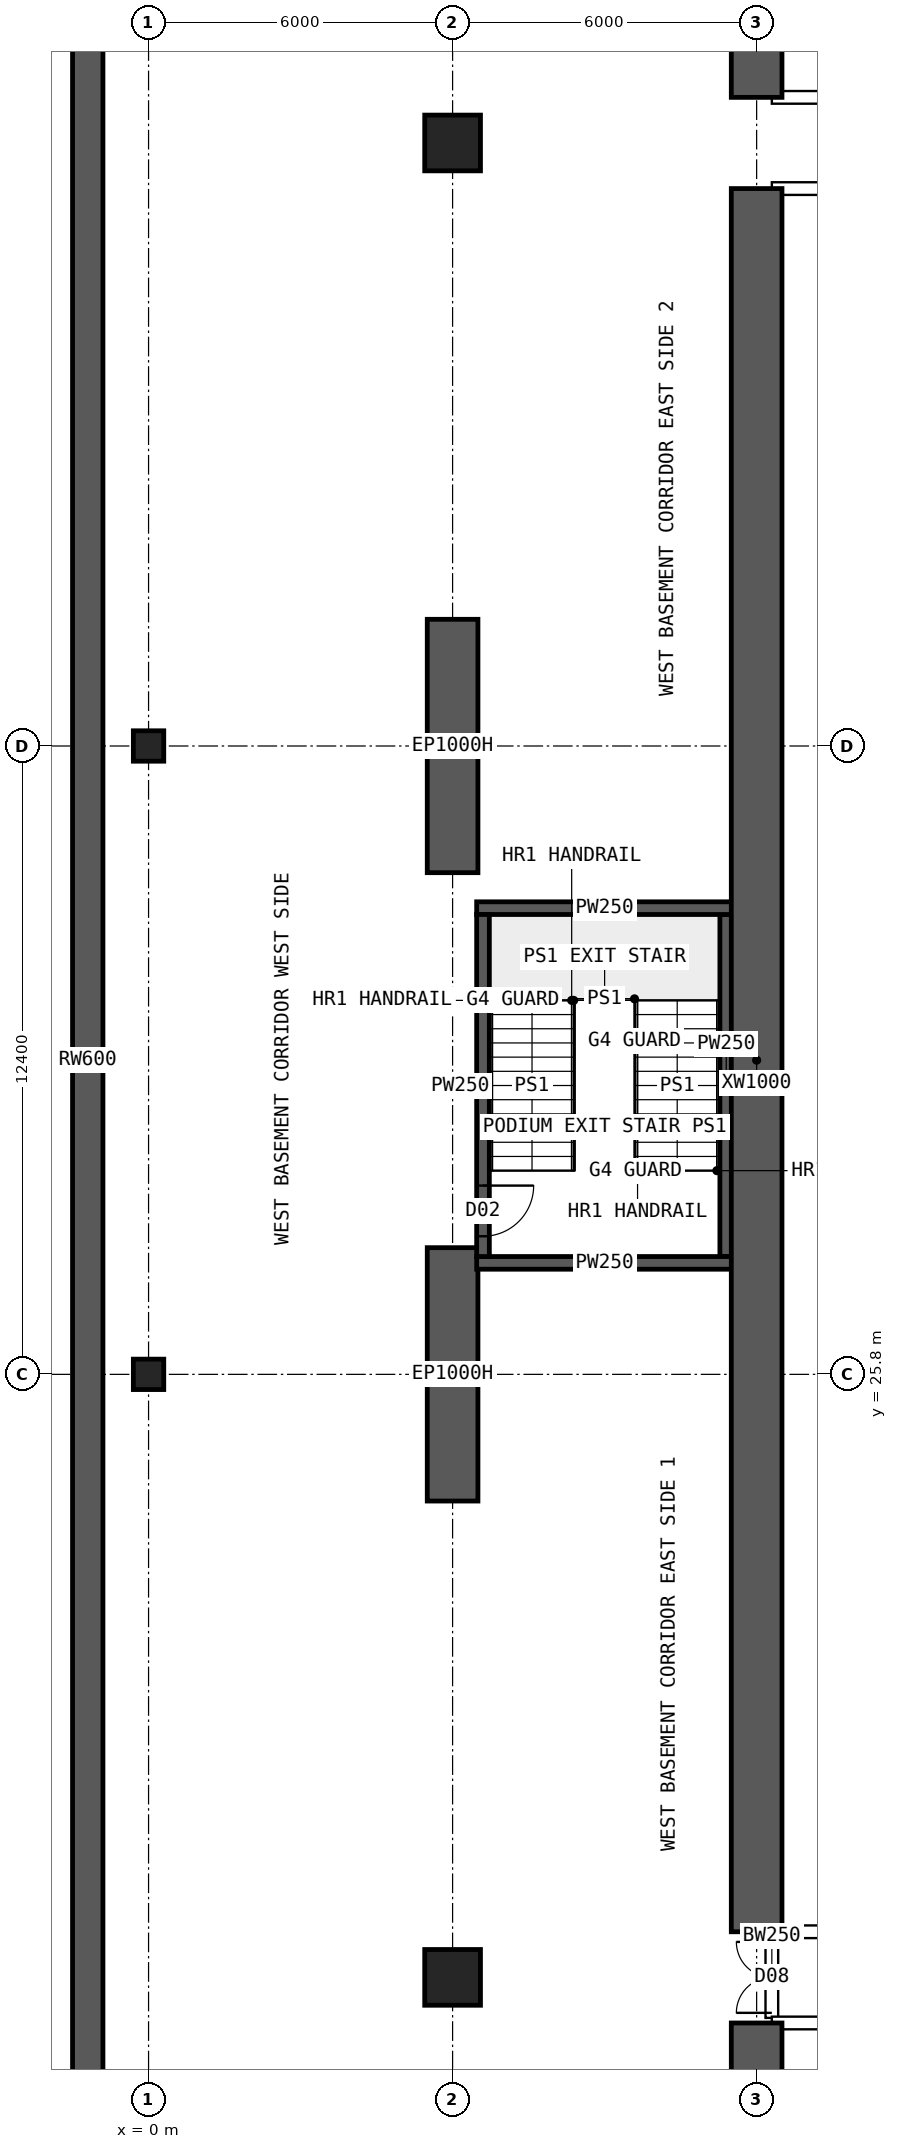
"""IFC4 building model, lengths in metres.
Left out: names, types, materials, properties, quantities, classifications, styles, units other than length and angle.
Written with IfcOpenShell. Run it as: python <this file> out.ifc"""

import sys

from ifc_helpers import new_model, si_unit, direction, frame, frame_2d, origin, origin_2d, place, context, subcontext, project, spatial, polyline, rectangle, hollow_rectangle, outline, extrude, element, fill, save


model = new_model("IFC4")
c1 = context("Model", 3, precision=1e-05, world=origin(), true_north=direction((0.0, 1.0)))
c2 = subcontext(c1, "Body", "Model", "MODEL_VIEW")
j1 = project(units=[si_unit("LENGTHUNIT", "METRE"), si_unit("PLANEANGLEUNIT", "RADIAN")], contexts=[c1])
p1 = place(None, origin())
s1 = spatial("IfcSite", under=j1, at=p1, CompositionType="ELEMENT")
p2 = place(p1, origin())
s2 = spatial("IfcBuilding", under=s1, at=p2, CompositionType="ELEMENT")
p3 = place(p2, frame((0.0, 0.0, -9.0)))
s3 = spatial("IfcBuildingStorey", under=s2, at=p3, CompositionType="ELEMENT", Elevation=-9.0)
for number, where, z_axis, x_axis in (
    (1, (6.0, 23.3, 0.0), (0.0, 0.0, 1.0), (0.0, 1.0, 0.0)),
    (2, (6.0, 35.7, 0.0), (0.0, 0.0, 1.0), (0.0, 1.0, 0.0)),
):
    element("IfcWall", number, at=place(p3, frame(where, z_axis=z_axis, x_axis=x_axis)), inside=s3, PredefinedType="SHEAR", context=c2, shape_type="SweptSolid", body=[
        extrude(rectangle(XDim=5.0, YDim=1.0, at=frame_2d((2.5, 0.0))), origin(), (0.0, 0.0, 1.0), 4.5),
    ])
for number, where, z_axis, x_axis in (
    (3, (6.0, 13.9, -0.5), (0.0, 0.0, 1.0), (1.0, 0.0, 0.0)),
    (4, (6.0, 50.1, -0.5), (0.0, 0.0, 1.0), (1.0, 0.0, 0.0)),
):
    element("IfcColumn", number, at=place(p3, frame(where, z_axis=z_axis, x_axis=x_axis)), inside=s3, PredefinedType="COLUMN", context=c2, shape_type="SweptSolid", body=[
        extrude(hollow_rectangle(XDim=1.1, YDim=1.1, WallThickness=0.11, at=origin_2d()), origin(), (0.0, 0.0, 1.0), 5.0),
    ])
for number, where, z_axis, x_axis in (
    (5, (0.0, 25.8, -0.5), (0.0, 0.0, 1.0), (1.0, 0.0, 0.0)),
    (6, (0.0, 38.2, -0.5), (0.0, 0.0, 1.0), (1.0, 0.0, 0.0)),
):
    element("IfcColumn", number, at=place(p3, frame(where, z_axis=z_axis, x_axis=x_axis)), inside=s3, PredefinedType="COLUMN", context=c2, shape_type="SweptSolid", body=[
        extrude(hollow_rectangle(XDim=0.6, YDim=0.6, WallThickness=0.06, at=origin_2d()), origin(), (0.0, 0.0, 1.0), 5.0),
    ])
p4 = place(p3, frame((6.475, 28.0, 0.0), z_axis=(0.0, 0.0, 1.0), x_axis=(1.0, 0.0, 0.0)))
e7 = element("IfcWall", 7, at=p4, inside=s3, PredefinedType="SHEAR", context=c2, shape_type="SweptSolid", body=[
    extrude(rectangle(XDim=5.05, YDim=0.25, at=frame_2d((2.525, 0.0))), origin(), (0.0, 0.0, 1.0), 4.5),
])
p5 = place(p3, frame((11.4, 28.125, 0.0), z_axis=(0.0, 0.0, 1.0), x_axis=(0.0, 1.0, 0.0)))
e8 = element("IfcWall", 8, at=p5, inside=s3, PredefinedType="SHEAR", context=c2, shape_type="SweptSolid", body=[
    extrude(rectangle(XDim=6.75, YDim=0.25, at=frame_2d((3.375, 0.0))), origin(), (0.0, 0.0, 1.0), 4.5),
])
p6 = place(p3, frame((11.525, 35.0, 0.0), z_axis=(0.0, 0.0, 1.0), x_axis=(-1.0, 0.0, 0.0)))
e9 = element("IfcWall", 9, at=p6, inside=s3, PredefinedType="SHEAR", context=c2, shape_type="SweptSolid", body=[
    extrude(rectangle(XDim=5.05, YDim=0.25, at=frame_2d((2.525, 0.0))), origin(), (0.0, 0.0, 1.0), 4.5),
])
p7 = place(p3, frame((6.6, 34.875, 0.0), z_axis=(0.0, 0.0, 1.0), x_axis=(0.0, -1.0, 0.0)))
e10 = element("IfcWall", 10, at=p7, inside=s3, PredefinedType="SHEAR", context=c2, shape_type="SweptSolid", body=[
    extrude(rectangle(XDim=6.75, YDim=0.25, at=frame_2d((3.375, 0.0))), origin(), (0.0, 0.0, 1.0), 4.5),
])
p8 = place(p7, frame((5.35, 0.0, 0.0)))
e11 = element("IfcOpeningElement", 11, at=p8, cuts=e10, PredefinedType="OPENING", context=c2, shape_type="SweptSolid", body=[
    extrude(rectangle(XDim=1.0, YDim=2.1, at=frame_2d((0.5, 1.05))), frame((0.0, 0.135, 0.0), z_axis=(0.0, -1.0, 0.0), x_axis=(1.0, 0.0, 0.0)), (0.0, 0.0, 1.0), 0.27),
])
for number, where, z_axis, x_axis in (
    (12, (12.0, 7.7, 0.0), (0.0, 0.0, 1.0), (0.0, 1.0, 0.0)),
    (13, (12.0, 51.0, 0.0), (0.0, 0.0, 1.0), (0.0, 1.0, 0.0)),
):
    element("IfcWall", number, at=place(p3, frame(where, z_axis=z_axis, x_axis=x_axis)), inside=s3, PredefinedType="SHEAR", context=c2, shape_type="SweptSolid", body=[
        extrude(rectangle(XDim=5.3, YDim=1.0, at=frame_2d((2.65, 0.0))), origin(), (0.0, 0.0, 1.0), 4.5),
    ])
p9 = place(p3, frame((12.0, 14.8, 0.0), z_axis=(0.0, 0.0, 1.0), x_axis=(0.0, 1.0, 0.0)))
e14 = element("IfcWall", 14, at=p9, inside=s3, PredefinedType="SHEAR", context=c2, shape_type="SweptSolid", body=[
    extrude(rectangle(XDim=34.4, YDim=1.0, at=frame_2d((17.2, 0.0))), origin(), (0.0, 0.0, 1.0), 4.5),
])
p10 = place(p3, frame((-1.2, 59.47, 0.0), z_axis=(0.0, 0.0, 1.0), x_axis=(0.0, -1.0, 0.0)))
e15 = element("IfcWall", 15, at=p10, inside=s3, PredefinedType="SOLIDWALL", context=c2, shape_type="SweptSolid", body=[
    extrude(outline(polyline([(-0.03, -0.3), (54.97, -0.3), (54.911, 0.3), (0.03, 0.3), (-0.03, -0.3)])), origin(), (0.0, 0.0, 1.0), 4.5),
])
for number, where, z_axis, x_axis in (
    (16, (12.3, 13.0, 0.0), (0.0, 0.0, 1.0), (1.0, 0.0, 0.0)),
    (17, (12.3, 51.0, 0.0), (0.0, 0.0, 1.0), (1.0, 0.0, 0.0)),
):
    element("IfcWall", number, at=place(p3, frame(where, z_axis=z_axis, x_axis=x_axis)), inside=s3, PredefinedType="SOLIDWALL", context=c2, shape_type="SweptSolid", body=[
        extrude(rectangle(XDim=5.2, YDim=0.25, at=frame_2d((2.6, 0.0))), origin(), (0.0, 0.0, 1.0), 4.2),
    ])
for number, where, z_axis, x_axis in (
    (18, (12.3, 14.8, 0.0), (0.0, 0.0, 1.0), (1.0, 0.0, 0.0)),
    (19, (12.3, 49.2, 0.0), (0.0, 0.0, 1.0), (1.0, 0.0, 0.0)),
):
    element("IfcWall", number, at=place(p3, frame(where, z_axis=z_axis, x_axis=x_axis)), inside=s3, PredefinedType="SOLIDWALL", context=c2, shape_type="SweptSolid", body=[
        extrude(rectangle(XDim=3.3, YDim=0.25, at=frame_2d((1.65, 0.0))), origin(), (0.0, 0.0, 1.0), 4.2),
    ])
p11 = place(p3, frame((12.3, 13.1, 0.0), z_axis=(0.0, 0.0, 1.0), x_axis=(0.0, 1.0, 0.0)))
e20 = element("IfcWall", 20, at=p11, inside=s3, PredefinedType="SOLIDWALL", context=c2, shape_type="SweptSolid", body=[
    extrude(rectangle(XDim=1.6, YDim=0.25, at=frame_2d((0.8, 0.0))), origin(), (0.0, 0.0, 1.0), 4.2),
])
p12 = place(p11, frame((0.1, 0.0, 0.0)))
e21 = element("IfcOpeningElement", 21, at=p12, cuts=e20, PredefinedType="OPENING", context=c2, shape_type="SweptSolid", body=[
    extrude(rectangle(XDim=1.4, YDim=2.1, at=frame_2d((0.7, 1.05))), frame((0.0, 0.135, 0.0), z_axis=(0.0, -1.0, 0.0), x_axis=(1.0, 0.0, 0.0)), (0.0, 0.0, 1.0), 0.27),
])
p13 = place(p8, origin())
e22 = element("IfcDoor", 22, at=p13, inside=s3, OperationType="SINGLE_SWING_LEFT", PredefinedType="DOOR", context=c2, shape_type="SweptSolid", body=[
    extrude(rectangle(XDim=1.0, YDim=2.1, at=frame_2d((0.5, 1.05))), frame((0.0, 0.025, 0.0), z_axis=(0.0, -1.0, 0.0), x_axis=(1.0, 0.0, 0.0)), (0.0, 0.0, 1.0), 0.05),
])
fill(e11, e22)
p14 = place(p12, origin())
e23 = element("IfcDoor", 23, at=p14, inside=s3, OperationType="DOUBLE_DOOR_SINGLE_SWING", PredefinedType="DOOR", context=c2, shape_type="SweptSolid", body=[
    extrude(rectangle(XDim=1.4, YDim=2.1, at=frame_2d((0.7, 1.05))), frame((0.0, 0.025, 0.0), z_axis=(0.0, -1.0, 0.0), x_axis=(1.0, 0.0, 0.0)), (0.0, 0.0, 1.0), 0.05),
])
fill(e21, e23)
save(model, sys.argv[1])
